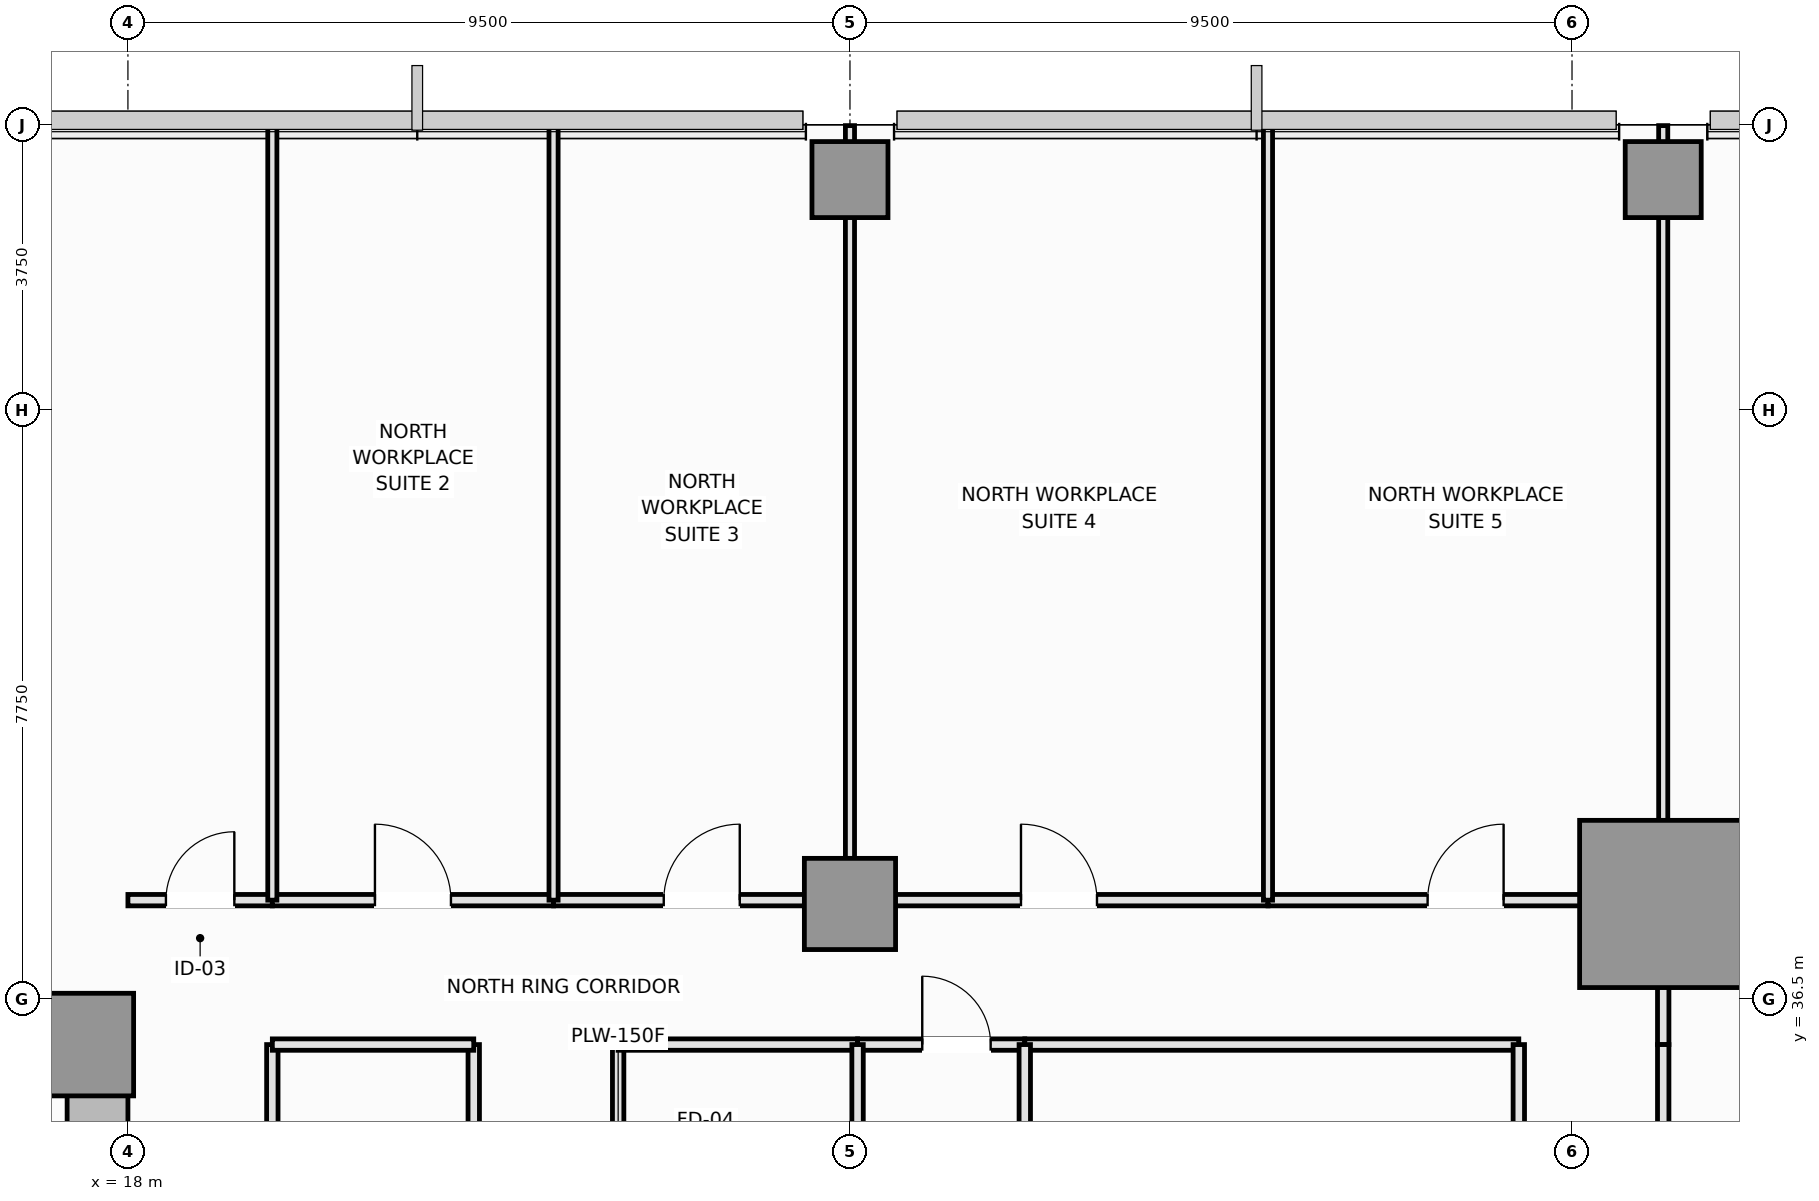
"""IFC4 building model, lengths in metres.
Left out: names, types, materials, properties, quantities, classifications, styles, units other than length and angle.
Written with IfcOpenShell. Run it as: python <this file> out.ifc"""

import sys

from ifc_helpers import new_model, si_unit, direction, frame, frame_2d, origin, origin_2d, place, context, subcontext, project, spatial, rectangle, extrude, element, fill, save


model = new_model("IFC4")
c1 = context("Model", 3, precision=1e-05, world=origin(), true_north=direction((0.0, 1.0)))
c2 = subcontext(c1, "Body", "Model", "MODEL_VIEW")
j1 = project(units=[si_unit("LENGTHUNIT", "METRE"), si_unit("PLANEANGLEUNIT", "RADIAN")], contexts=[c1])
p1 = place(None, origin())
s1 = spatial("IfcSite", under=j1, at=p1, CompositionType="ELEMENT")
p2 = place(p1, origin())
s2 = spatial("IfcBuilding", under=s1, at=p2, CompositionType="ELEMENT")
p3 = place(p2, frame((0.0, 0.0, 61.1)))
s3 = spatial("IfcBuildingStorey", under=s2, at=p3, CompositionType="ELEMENT", Elevation=61.1)
p4 = place(p3, frame((4.5, 36.1, 0.0), z_axis=(0.0, 0.0, 1.0), x_axis=(1.0, 0.0, 0.0)))
e1 = element("IfcWall", 1, at=p4, inside=s3, PredefinedType="SHEAR", context=c2, shape_type="SweptSolid", body=[
    extrude(rectangle(XDim=13.5, YDim=0.8, at=frame_2d((6.75, 0.0))), origin(), (0.0, 0.0, 1.0), 3.55),
])
p5 = place(p3, frame((17.6, 27.05, 0.0), z_axis=(0.0, 0.0, 1.0), x_axis=(0.0, 1.0, 0.0)))
e2 = element("IfcWall", 2, at=p5, inside=s3, PredefinedType="SHEAR", context=c2, shape_type="SweptSolid", body=[
    extrude(rectangle(XDim=8.65, YDim=0.8, at=frame_2d((4.325, 0.0))), origin(), (0.0, 0.0, 1.0), 3.55),
])
p6 = place(p5, frame((3.45, 0.0, 0.0)))
e3 = element("IfcOpeningElement", 3, at=p6, cuts=e2, PredefinedType="OPENING", context=c2, shape_type="SweptSolid", body=[
    extrude(rectangle(XDim=1.1, YDim=2.15, at=frame_2d((0.55, 1.075))), frame((0.0, 0.41, 0.0), z_axis=(0.0, -1.0, 0.0), x_axis=(1.0, 0.0, 0.0)), (0.0, 0.0, 1.0), 0.82),
])
p7 = place(p3, frame((17.4, 35.9, 0.0), z_axis=(0.0, 0.0, 1.0), x_axis=(1.0, 0.0, 0.0)))
e4 = element("IfcColumn", 4, at=p7, inside=s3, PredefinedType="PILASTER", context=c2, shape_type="SweptSolid", body=[
    extrude(rectangle(XDim=1.35, YDim=1.35, at=origin_2d()), origin(), (0.0, 0.0, 1.0), 3.55),
])
p8 = place(p3, frame((38.2, 37.75, 0.0), z_axis=(0.0, 0.0, 1.0), x_axis=(1.0, 0.0, 0.0)))
e5 = element("IfcColumn", 5, at=p8, inside=s3, PredefinedType="COLUMN", context=c2, shape_type="SweptSolid", body=[
    extrude(rectangle(XDim=2.2, YDim=2.2, at=origin_2d()), origin(), (0.0, 0.0, 1.0), 3.55),
])
p9 = place(p3, frame((27.5, 37.75, 0.0), z_axis=(0.0, 0.0, 1.0), x_axis=(1.0, 0.0, 0.0)))
e6 = element("IfcColumn", 6, at=p9, inside=s3, PredefinedType="COLUMN", context=c2, shape_type="SweptSolid", body=[
    extrude(rectangle(XDim=1.2, YDim=1.2, at=origin_2d()), origin(), (0.0, 0.0, 1.0), 3.55),
])
for number, where, z_axis, x_axis in (
    (7, (27.5, 47.28, 0.0), (0.0, 0.0, 1.0), (1.0, 0.0, 0.0)),
    (8, (38.2, 47.28, 0.0), (0.0, 0.0, 1.0), (1.0, 0.0, 0.0)),
):
    element("IfcColumn", number, at=place(p3, frame(where, z_axis=z_axis, x_axis=x_axis)), inside=s3, PredefinedType="COLUMN", context=c2, shape_type="SweptSolid", body=[
        extrude(rectangle(XDim=1.0, YDim=1.0, at=origin_2d()), origin(), (0.0, 0.0, 1.0), 3.55),
    ])
p10 = place(p3, frame((22.55, 29.75, 0.0), z_axis=(0.0, 0.0, 1.0), x_axis=(0.0, 1.0, 0.0)))
e9 = element("IfcWall", 9, at=p10, inside=s3, PredefinedType="PARTITIONING", context=c2, shape_type="SweptSolid", body=[
    extrude(rectangle(XDim=6.15, YDim=0.15, at=frame_2d((3.075, 0.0))), origin(), (0.0, 0.0, 1.0), 3.01),
])
p11 = place(p10, frame((2.575, 0.0, 0.0)))
e10 = element("IfcOpeningElement", 10, at=p11, cuts=e9, PredefinedType="OPENING", context=c2, shape_type="SweptSolid", body=[
    extrude(rectangle(XDim=1.0, YDim=2.15, at=frame_2d((0.5, 1.075))), frame((0.0, 0.085, 0.0), z_axis=(0.0, -1.0, 0.0), x_axis=(1.0, 0.0, 0.0)), (0.0, 0.0, 1.0), 0.17),
])
p12 = place(p3, frame((24.45, 32.8, 0.0), z_axis=(0.0, 0.0, 1.0), x_axis=(0.0, 1.0, 0.0)))
e11 = element("IfcWall", 11, at=p12, inside=s3, PredefinedType="PLUMBINGWALL", context=c2, shape_type="SweptSolid", body=[
    extrude(rectangle(XDim=3.1, YDim=0.15, at=frame_2d((1.55, 0.0))), origin(), (0.0, 0.0, 1.0), 3.37),
])
p13 = place(p12, frame((1.1, 0.0, 0.0)))
e12 = element("IfcOpeningElement", 12, at=p13, cuts=e11, PredefinedType="OPENING", context=c2, shape_type="SweptSolid", body=[
    extrude(rectangle(XDim=0.9, YDim=2.1, at=frame_2d((0.45, 1.05))), frame((0.0, 0.085, 0.0), z_axis=(0.0, -1.0, 0.0), x_axis=(1.0, 0.0, 0.0)), (0.0, 0.0, 1.0), 0.17),
])
p14 = place(p3, frame((19.9, 29.75, 0.0), z_axis=(0.0, 0.0, 1.0), x_axis=(0.0, 1.0, 0.0)))
e13 = element("IfcWall", 13, at=p14, inside=s3, PredefinedType="PARTITIONING", context=c2, shape_type="SweptSolid", body=[
    extrude(rectangle(XDim=6.15, YDim=0.15, at=frame_2d((3.075, 0.0))), origin(), (0.0, 0.0, 1.0), 3.37),
])
p15 = place(p3, frame((19.9, 35.9, 0.0), z_axis=(0.0, 0.0, 1.0), x_axis=(1.0, 0.0, 0.0)))
e14 = element("IfcWall", 14, at=p15, inside=s3, PredefinedType="PARTITIONING", context=c2, shape_type="SweptSolid", body=[
    extrude(rectangle(XDim=2.65, YDim=0.15, at=frame_2d((1.325, 0.0))), origin(), (0.0, 0.0, 1.0), 3.37),
])
p16 = place(p3, frame((24.45, 35.9, 0.0), z_axis=(0.0, 0.0, 1.0), x_axis=(1.0, 0.0, 0.0)))
e15 = element("IfcWall", 15, at=p16, inside=s3, PredefinedType="PLUMBINGWALL", context=c2, shape_type="SweptSolid", body=[
    extrude(rectangle(XDim=3.15, YDim=0.15, at=frame_2d((1.575, 0.0))), origin(), (0.0, 0.0, 1.0), 3.37),
])
p17 = place(p3, frame((27.6, 35.9, 0.0), z_axis=(0.0, 0.0, 1.0), x_axis=(1.0, 0.0, 0.0)))
e16 = element("IfcWall", 16, at=p17, inside=s3, PredefinedType="PLUMBINGWALL", context=c2, shape_type="SweptSolid", body=[
    extrude(rectangle(XDim=2.2, YDim=0.15, at=frame_2d((1.1, 0.0))), origin(), (0.0, 0.0, 1.0), 3.37),
])
p18 = place(p17, frame((0.851, 0.0, 0.0)))
e17 = element("IfcOpeningElement", 17, at=p18, cuts=e16, PredefinedType="OPENING", context=c2, shape_type="SweptSolid", body=[
    extrude(rectangle(XDim=0.9, YDim=2.1, at=frame_2d((0.45, 1.05))), frame((0.0, 0.085, 0.0), z_axis=(0.0, -1.0, 0.0), x_axis=(1.0, 0.0, 0.0)), (0.0, 0.0, 1.0), 0.17),
])
p19 = place(p3, frame((29.8, 35.9, 0.0), z_axis=(0.0, 0.0, 1.0), x_axis=(1.0, 0.0, 0.0)))
e18 = element("IfcWall", 18, at=p19, inside=s3, PredefinedType="PARTITIONING", context=c2, shape_type="SweptSolid", body=[
    extrude(rectangle(XDim=6.5, YDim=0.15, at=frame_2d((3.25, 0.0))), origin(), (0.0, 0.0, 1.0), 3.37),
])
p20 = place(p3, frame((18.0, 37.8, 0.0), z_axis=(0.0, 0.0, 1.0), x_axis=(1.0, 0.0, 0.0)))
e19 = element("IfcWall", 19, at=p20, inside=s3, PredefinedType="PARTITIONING", context=c2, shape_type="SweptSolid", body=[
    extrude(rectangle(XDim=1.9, YDim=0.15, at=frame_2d((0.95, 0.0))), origin(), (0.0, 0.0, 1.0), 2.72),
])
p21 = place(p20, frame((0.5, 0.0, 0.0)))
e20 = element("IfcOpeningElement", 20, at=p21, cuts=e19, PredefinedType="OPENING", context=c2, shape_type="SweptSolid", body=[
    extrude(rectangle(XDim=0.9, YDim=2.1, at=frame_2d((0.45, 1.05))), frame((0.0, 0.085, 0.0), z_axis=(0.0, -1.0, 0.0), x_axis=(1.0, 0.0, 0.0)), (0.0, 0.0, 1.0), 0.17),
])
p22 = place(p3, frame((19.9, 37.8, 0.0), z_axis=(0.0, 0.0, 1.0), x_axis=(1.0, 0.0, 0.0)))
e21 = element("IfcWall", 21, at=p22, inside=s3, PredefinedType="PARTITIONING", context=c2, shape_type="SweptSolid", body=[
    extrude(rectangle(XDim=3.7, YDim=0.15, at=frame_2d((1.85, 0.0))), origin(), (0.0, 0.0, 1.0), 2.72),
])
p23 = place(p22, frame((1.35, 0.0, 0.0)))
e22 = element("IfcOpeningElement", 22, at=p23, cuts=e21, PredefinedType="OPENING", context=c2, shape_type="SweptSolid", body=[
    extrude(rectangle(XDim=1.0, YDim=2.15, at=frame_2d((0.5, 1.075))), frame((0.0, 0.085, 0.0), z_axis=(0.0, -1.0, 0.0), x_axis=(1.0, 0.0, 0.0)), (0.0, 0.0, 1.0), 0.17),
])
p24 = place(p3, frame((23.6, 37.8, 0.0), z_axis=(0.0, 0.0, 1.0), x_axis=(1.0, 0.0, 0.0)))
e23 = element("IfcWall", 23, at=p24, inside=s3, PredefinedType="PARTITIONING", context=c2, shape_type="SweptSolid", body=[
    extrude(rectangle(XDim=3.9, YDim=0.15, at=frame_2d((1.95, 0.0))), origin(), (0.0, 0.0, 1.0), 2.72),
])
p25 = place(p24, frame((1.45, 0.0, 0.0)))
e24 = element("IfcOpeningElement", 24, at=p25, cuts=e23, PredefinedType="OPENING", context=c2, shape_type="SweptSolid", body=[
    extrude(rectangle(XDim=1.0, YDim=2.15, at=frame_2d((0.5, 1.075))), frame((0.0, 0.085, 0.0), z_axis=(0.0, -1.0, 0.0), x_axis=(1.0, 0.0, 0.0)), (0.0, 0.0, 1.0), 0.17),
])
p26 = place(p3, frame((27.5, 37.8, 0.0), z_axis=(0.0, 0.0, 1.0), x_axis=(1.0, 0.0, 0.0)))
e25 = element("IfcWall", 25, at=p26, inside=s3, PredefinedType="PARTITIONING", context=c2, shape_type="SweptSolid", body=[
    extrude(rectangle(XDim=5.5, YDim=0.15, at=frame_2d((2.75, 0.0))), origin(), (0.0, 0.0, 1.0), 2.72),
])
p27 = place(p26, frame((2.25, 0.0, 0.0)))
e26 = element("IfcOpeningElement", 26, at=p27, cuts=e25, PredefinedType="OPENING", context=c2, shape_type="SweptSolid", body=[
    extrude(rectangle(XDim=1.0, YDim=2.15, at=frame_2d((0.5, 1.075))), frame((0.0, 0.085, 0.0), z_axis=(0.0, -1.0, 0.0), x_axis=(1.0, 0.0, 0.0)), (0.0, 0.0, 1.0), 0.17),
])
p28 = place(p3, frame((33.0, 37.8, 0.0), z_axis=(0.0, 0.0, 1.0), x_axis=(1.0, 0.0, 0.0)))
e27 = element("IfcWall", 27, at=p28, inside=s3, PredefinedType="PARTITIONING", context=c2, shape_type="SweptSolid", body=[
    extrude(rectangle(XDim=5.2, YDim=0.15, at=frame_2d((2.6, 0.0))), origin(), (0.0, 0.0, 1.0), 2.72),
])
p29 = place(p28, frame((2.1, 0.0, 0.0)))
e28 = element("IfcOpeningElement", 28, at=p29, cuts=e27, PredefinedType="OPENING", context=c2, shape_type="SweptSolid", body=[
    extrude(rectangle(XDim=1.0, YDim=2.15, at=frame_2d((0.5, 1.075))), frame((0.0, 0.085, 0.0), z_axis=(0.0, -1.0, 0.0), x_axis=(1.0, 0.0, 0.0)), (0.0, 0.0, 1.0), 0.17),
])
p30 = place(p3, frame((38.2, 35.9, 0.0), z_axis=(0.0, 0.0, 1.0), x_axis=(0.0, 1.0, 0.0)))
e29 = element("IfcWall", 29, at=p30, inside=s3, PredefinedType="PARTITIONING", context=c2, shape_type="SweptSolid", body=[
    extrude(rectangle(XDim=1.9, YDim=0.15, at=frame_2d((0.95, 0.0))), origin(), (0.0, 0.0, 1.0), 2.82),
])
p31 = place(p3, frame((36.3, 32.8, 0.0), z_axis=(0.0, 0.0, 1.0), x_axis=(0.0, 1.0, 0.0)))
e30 = element("IfcWall", 30, at=p31, inside=s3, PredefinedType="PARTITIONING", context=c2, shape_type="SweptSolid", body=[
    extrude(rectangle(XDim=3.1, YDim=0.15, at=frame_2d((1.55, 0.0))), origin(), (0.0, 0.0, 1.0), 3.37),
])
p32 = place(p31, frame((1.05, 0.0, 0.0)))
e31 = element("IfcOpeningElement", 31, at=p32, cuts=e30, PredefinedType="OPENING", context=c2, shape_type="SweptSolid", body=[
    extrude(rectangle(XDim=1.0, YDim=2.15, at=frame_2d((0.5, 1.075))), frame((0.0, 0.085, 0.0), z_axis=(0.0, -1.0, 0.0), x_axis=(1.0, 0.0, 0.0)), (0.0, 0.0, 1.0), 0.17),
])
p33 = place(p3, frame((38.2, 28.65, 0.0), z_axis=(0.0, 0.0, 1.0), x_axis=(0.0, 1.0, 0.0)))
e32 = element("IfcWall", 32, at=p33, inside=s3, PredefinedType="PARTITIONING", context=c2, shape_type="SweptSolid", body=[
    extrude(rectangle(XDim=7.25, YDim=0.15, at=frame_2d((3.625, 0.0))), origin(), (0.0, 0.0, 1.0), 2.82),
])
p34 = place(p33, frame((4.303, 0.0, 0.0)))
e33 = element("IfcOpeningElement", 33, at=p34, cuts=e32, PredefinedType="OPENING", context=c2, shape_type="SweptSolid", body=[
    extrude(rectangle(XDim=1.0, YDim=2.15, at=frame_2d((0.5, 1.075))), frame((0.0, 0.085, 0.0), z_axis=(0.0, -1.0, 0.0), x_axis=(1.0, 0.0, 0.0)), (0.0, 0.0, 1.0), 0.17),
])
for number, where, z_axis, x_axis in (
    (34, (27.6, 32.8, 0.0), (0.0, 0.0, 1.0), (0.0, 1.0, 0.0)),
    (35, (29.8, 32.8, 0.0), (0.0, 0.0, 1.0), (0.0, 1.0, 0.0)),
):
    element("IfcWall", number, at=place(p3, frame(where, z_axis=z_axis, x_axis=x_axis)), inside=s3, PredefinedType="PLUMBINGWALL", context=c2, shape_type="SweptSolid", body=[
        extrude(rectangle(XDim=3.1, YDim=0.15, at=frame_2d((1.55, 0.0))), origin(), (0.0, 0.0, 1.0), 3.37),
    ])
for number, where, z_axis, x_axis in (
    (36, (19.9, 37.8, 0.0), (0.0, 0.0, 1.0), (0.0, 1.0, 0.0)),
    (37, (23.6, 37.8, 0.0), (0.0, 0.0, 1.0), (0.0, 1.0, 0.0)),
):
    element("IfcWall", number, at=place(p3, frame(where, z_axis=z_axis, x_axis=x_axis)), inside=s3, PredefinedType="PARTITIONING", context=c2, shape_type="SweptSolid", body=[
        extrude(rectangle(XDim=10.19, YDim=0.12, at=frame_2d((5.095, 0.0))), origin(), (0.0, 0.0, 1.0), 3.37),
    ])
p35 = place(p3, frame((27.5, 37.8, 0.0), z_axis=(0.0, 0.0, 1.0), x_axis=(0.0, 1.0, 0.0)))
e38 = element("IfcWall", 38, at=p35, inside=s3, PredefinedType="PARTITIONING", context=c2, shape_type="SweptSolid", body=[
    extrude(rectangle(XDim=10.19, YDim=0.12, at=frame_2d((5.095, 0.0))), origin(), (0.0, 0.0, 1.0), 2.82),
])
p36 = place(p3, frame((33.0, 37.8, 0.0), z_axis=(0.0, 0.0, 1.0), x_axis=(0.0, 1.0, 0.0)))
e39 = element("IfcWall", 39, at=p36, inside=s3, PredefinedType="PARTITIONING", context=c2, shape_type="SweptSolid", body=[
    extrude(rectangle(XDim=10.19, YDim=0.12, at=frame_2d((5.095, 0.0))), origin(), (0.0, 0.0, 1.0), 3.37),
])
p37 = place(p3, frame((38.2, 37.8, 0.0), z_axis=(0.0, 0.0, 1.0), x_axis=(0.0, 1.0, 0.0)))
e40 = element("IfcWall", 40, at=p37, inside=s3, PredefinedType="PARTITIONING", context=c2, shape_type="SweptSolid", body=[
    extrude(rectangle(XDim=10.19, YDim=0.12, at=frame_2d((5.095, 0.0))), origin(), (0.0, 0.0, 1.0), 2.82),
])
p38 = place(p18, origin())
e41 = element("IfcDoor", 41, at=p38, inside=s3, OperationType="SINGLE_SWING_LEFT", PredefinedType="DOOR", context=c2, shape_type="SweptSolid", body=[
    extrude(rectangle(XDim=0.9, YDim=2.1, at=frame_2d((0.45, 1.05))), frame((0.0, 0.025, 0.0), z_axis=(0.0, -1.0, 0.0), x_axis=(1.0, 0.0, 0.0)), (0.0, 0.0, 1.0), 0.05),
])
fill(e17, e41)
p39 = place(p21, origin())
e42 = element("IfcDoor", 42, at=p39, inside=s3, OperationType="SINGLE_SWING_RIGHT", PredefinedType="DOOR", context=c2, shape_type="SweptSolid", body=[
    extrude(rectangle(XDim=0.9, YDim=2.1, at=frame_2d((0.45, 1.05))), frame((0.0, 0.025, 0.0), z_axis=(0.0, -1.0, 0.0), x_axis=(1.0, 0.0, 0.0)), (0.0, 0.0, 1.0), 0.05),
])
fill(e20, e42)
p40 = place(p23, origin())
e43 = element("IfcDoor", 43, at=p40, inside=s3, OperationType="SINGLE_SWING_LEFT", PredefinedType="DOOR", context=c2, shape_type="SweptSolid", body=[
    extrude(rectangle(XDim=1.0, YDim=2.15, at=frame_2d((0.5, 1.075))), frame((0.0, 0.025, 0.0), z_axis=(0.0, -1.0, 0.0), x_axis=(1.0, 0.0, 0.0)), (0.0, 0.0, 1.0), 0.05),
])
fill(e22, e43)
p41 = place(p25, origin())
e44 = element("IfcDoor", 44, at=p41, inside=s3, OperationType="SINGLE_SWING_RIGHT", PredefinedType="DOOR", context=c2, shape_type="SweptSolid", body=[
    extrude(rectangle(XDim=1.0, YDim=2.15, at=frame_2d((0.5, 1.075))), frame((0.0, 0.025, 0.0), z_axis=(0.0, -1.0, 0.0), x_axis=(1.0, 0.0, 0.0)), (0.0, 0.0, 1.0), 0.05),
])
fill(e24, e44)
p42 = place(p27, origin())
e45 = element("IfcDoor", 45, at=p42, inside=s3, OperationType="SINGLE_SWING_LEFT", PredefinedType="DOOR", context=c2, shape_type="SweptSolid", body=[
    extrude(rectangle(XDim=1.0, YDim=2.15, at=frame_2d((0.5, 1.075))), frame((0.0, 0.025, 0.0), z_axis=(0.0, -1.0, 0.0), x_axis=(1.0, 0.0, 0.0)), (0.0, 0.0, 1.0), 0.05),
])
fill(e26, e45)
p43 = place(p29, origin())
e46 = element("IfcDoor", 46, at=p43, inside=s3, OperationType="SINGLE_SWING_RIGHT", PredefinedType="DOOR", context=c2, shape_type="SweptSolid", body=[
    extrude(rectangle(XDim=1.0, YDim=2.15, at=frame_2d((0.5, 1.075))), frame((0.0, 0.025, 0.0), z_axis=(0.0, -1.0, 0.0), x_axis=(1.0, 0.0, 0.0)), (0.0, 0.0, 1.0), 0.05),
])
fill(e28, e46)
save(model, sys.argv[1])
